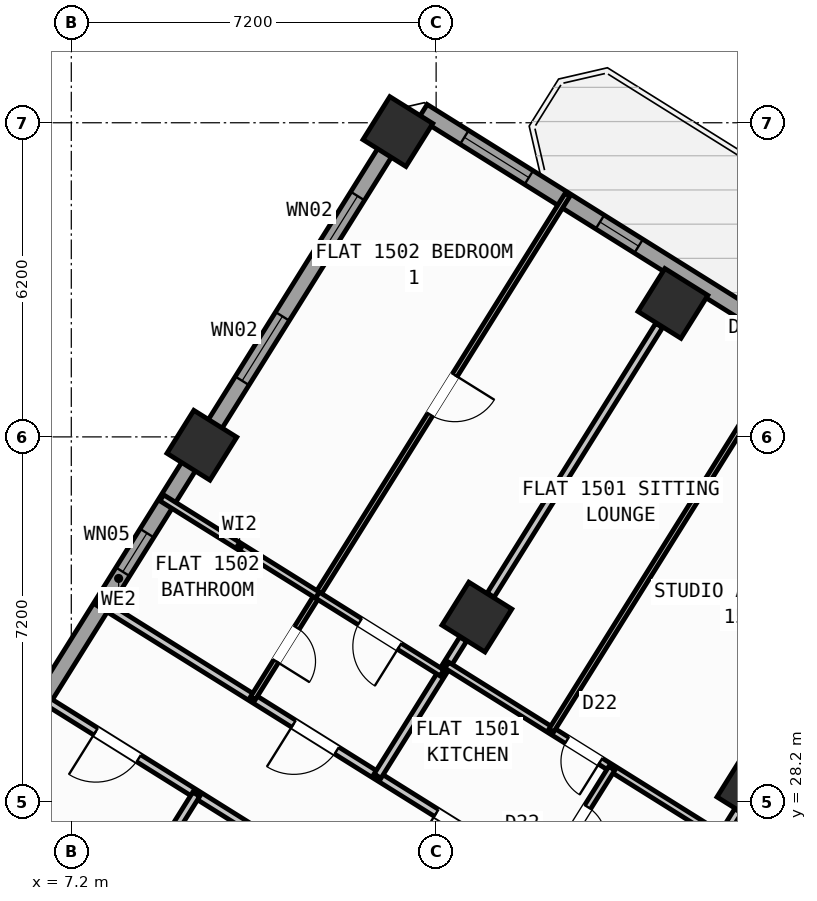
"""IFC4 building model, lengths in metres.
Left out: names, types, materials, properties, quantities, classifications, styles, units other than length and angle.
Written with IfcOpenShell. Run it as: python <this file> out.ifc"""

import sys

from ifc_helpers import new_model, si_unit, direction, frame, frame_2d, origin, origin_2d, place, context, subcontext, project, spatial, rectangle, hollow_rectangle, extrude, source, transform, mapped, element, fill, save


model = new_model("IFC4")
c1 = context("Model", 3, precision=1e-05, world=origin(), true_north=direction((0.0, 1.0)))
c2 = subcontext(c1, "Body", "Model", "MODEL_VIEW")
j1 = project(units=[si_unit("LENGTHUNIT", "METRE"), si_unit("PLANEANGLEUNIT", "RADIAN")], contexts=[c1])
p1 = place(None, origin())
s1 = spatial("IfcSite", under=j1, at=p1, CompositionType="ELEMENT")
p2 = place(p1, origin())
s2 = spatial("IfcBuilding", under=s1, at=p2, CompositionType="ELEMENT")
p3 = place(p2, frame((0.0, 0.0, 60.0)))
s3 = spatial("IfcBuildingStorey", under=s2, at=p3, CompositionType="ELEMENT", Elevation=60.0)
m1 = source(origin(), c2, "Body", "SweptSolid", [
    extrude(hollow_rectangle(XDim=1.0, YDim=1.0, WallThickness=0.04, at=origin_2d()), origin(), (0.0, 0.0, 1.0), 3.6),
])
for number, where, z_axis, x_axis in (
    (1, (20.632, 28.452, 0.0), (0.0, 0.0, 1.0), (-0.848, 0.53, 0.0)),
    (2, (19.073, 38.034, 0.0), (0.0, 0.0, 1.0), (-0.848, 0.53, 0.0)),
    (3, (15.205, 31.844, 0.0), (0.0, 0.0, 1.0), (-0.848, 0.53, 0.0)),
    (4, (13.646, 41.426, 0.0), (0.0, 0.0, 1.0), (-0.848, 0.53, 0.0)),
    (5, (9.777, 35.235, 0.0), (0.0, 0.0, 1.0), (-0.848, 0.53, 0.0)),
):
    element("IfcColumn", number, at=place(p3, frame(where, z_axis=z_axis, x_axis=x_axis)), inside=s3, PredefinedType="COLUMN", context=c2, shape_type="MappedRepresentation", body=[
        mapped(m1, transform((0.0, 0.0, 0.0), scale=1.0)),
    ])
p4 = place(p3, frame((2.415, 23.452, 0.0), z_axis=(0.0, 0.0, 1.0), x_axis=(0.52991049553, 0.848053575387, 0.0)))
e6 = element("IfcWall", 6, at=p4, inside=s3, PredefinedType="STANDARD", context=c2, shape_type="SweptSolid", body=[
    extrude(rectangle(XDim=21.587, YDim=0.32, at=frame_2d((10.794, 0.0))), origin(), (0.0, 0.0, 1.0), 2.725),
])
p5 = place(p4, frame((2.356, 0.0, 0.8)))
e7 = element("IfcOpeningElement", 7, at=p5, cuts=e6, PredefinedType="OPENING", context=c2, shape_type="SweptSolid", body=[
    extrude(rectangle(XDim=2.1, YDim=1.55, at=frame_2d((1.05, 0.775))), frame((0.0, 0.17, 0.0), z_axis=(0.0, -1.0, 0.0), x_axis=(1.0, 0.0, 0.0)), (0.0, 0.0, 1.0), 0.34),
])
p6 = place(p4, frame((10.949, 0.0, 1.0)))
e8 = element("IfcOpeningElement", 8, at=p6, cuts=e6, PredefinedType="OPENING", context=c2, shape_type="SweptSolid", body=[
    extrude(rectangle(XDim=0.9, YDim=1.25, at=frame_2d((0.45, 0.625))), frame((0.0, 0.17, 0.0), z_axis=(0.0, -1.0, 0.0), x_axis=(1.0, 0.0, 0.0)), (0.0, 0.0, 1.0), 0.34),
])
p7 = place(p4, frame((15.394, 0.0, 0.85)))
e9 = element("IfcOpeningElement", 9, at=p7, cuts=e6, PredefinedType="OPENING", context=c2, shape_type="SweptSolid", body=[
    extrude(rectangle(XDim=1.5, YDim=1.5, at=frame_2d((0.75, 0.75))), frame((0.0, 0.17, 0.0), z_axis=(0.0, -1.0, 0.0), x_axis=(1.0, 0.0, 0.0)), (0.0, 0.0, 1.0), 0.34),
])
p8 = place(p4, frame((18.194, 0.0, 0.85)))
e10 = element("IfcOpeningElement", 10, at=p8, cuts=e6, PredefinedType="OPENING", context=c2, shape_type="SweptSolid", body=[
    extrude(rectangle(XDim=1.5, YDim=1.5, at=frame_2d((0.75, 0.75))), frame((0.0, 0.17, 0.0), z_axis=(0.0, -1.0, 0.0), x_axis=(1.0, 0.0, 0.0)), (0.0, 0.0, 1.0), 0.34),
])
p9 = place(p3, frame((14.138, 41.825, 0.0), z_axis=(0.0, 0.0, 1.0), x_axis=(0.848046498049, -0.529921821731, 0.0)))
e11 = element("IfcWall", 11, at=p9, inside=s3, PredefinedType="STANDARD", context=c2, shape_type="SweptSolid", body=[
    extrude(rectangle(XDim=31.588, YDim=0.32, at=frame_2d((15.794, 0.0))), origin(), (0.0, 0.0, 1.0), 3.35),
])
p10 = place(p9, frame((9.772, 0.0, 0.0)))
e12 = element("IfcOpeningElement", 12, at=p10, cuts=e11, PredefinedType="OPENING", context=c2, shape_type="SweptSolid", body=[
    extrude(rectangle(XDim=1.05, YDim=2.15, at=frame_2d((0.525, 1.075))), frame((0.0, 0.17, 0.0), z_axis=(0.0, -1.0, 0.0), x_axis=(1.0, 0.0, 0.0)), (0.0, 0.0, 1.0), 0.34),
])
p11 = place(p9, frame((0.966, 0.0, 0.85)))
e13 = element("IfcOpeningElement", 13, at=p11, cuts=e11, PredefinedType="OPENING", context=c2, shape_type="SweptSolid", body=[
    extrude(rectangle(XDim=1.5, YDim=1.5, at=frame_2d((0.75, 0.75))), frame((0.0, 0.17, 0.0), z_axis=(0.0, -1.0, 0.0), x_axis=(1.0, 0.0, 0.0)), (0.0, 0.0, 1.0), 0.34),
])
p12 = place(p9, frame((4.121, 0.0, 1.0)))
e14 = element("IfcOpeningElement", 14, at=p12, cuts=e11, PredefinedType="OPENING", context=c2, shape_type="SweptSolid", body=[
    extrude(rectangle(XDim=0.9, YDim=1.25, at=frame_2d((0.45, 0.625))), frame((0.0, 0.17, 0.0), z_axis=(0.0, -1.0, 0.0), x_axis=(1.0, 0.0, 0.0)), (0.0, 0.0, 1.0), 0.34),
])
p13 = place(p9, frame((13.899, 0.0, 0.85)))
e15 = element("IfcOpeningElement", 15, at=p13, cuts=e11, PredefinedType="OPENING", context=c2, shape_type="SweptSolid", body=[
    extrude(rectangle(XDim=1.5, YDim=1.5, at=frame_2d((0.75, 0.75))), frame((0.0, 0.17, 0.0), z_axis=(0.0, -1.0, 0.0), x_axis=(1.0, 0.0, 0.0)), (0.0, 0.0, 1.0), 0.34),
])
p14 = place(p9, frame((22.019, 0.0, 0.95)))
e16 = element("IfcOpeningElement", 16, at=p14, cuts=e11, PredefinedType="OPENING", context=c2, shape_type="SweptSolid", body=[
    extrude(rectangle(XDim=1.2, YDim=1.4, at=frame_2d((0.6, 0.7))), frame((0.0, 0.17, 0.0), z_axis=(0.0, -1.0, 0.0), x_axis=(1.0, 0.0, 0.0)), (0.0, 0.0, 1.0), 0.34),
])
p15 = place(p9, frame((27.569, 0.0, 0.95)))
e17 = element("IfcOpeningElement", 17, at=p15, cuts=e11, PredefinedType="OPENING", context=c2, shape_type="SweptSolid", body=[
    extrude(rectangle(XDim=1.2, YDim=1.4, at=frame_2d((0.6, 0.7))), frame((0.0, 0.17, 0.0), z_axis=(0.0, -1.0, 0.0), x_axis=(1.0, 0.0, 0.0)), (0.0, 0.0, 1.0), 0.34),
])
p16 = place(p3, frame((21.885, 23.306, 0.0), z_axis=(0.0, 0.0, 1.0), x_axis=(-0.848052408131, 0.529912363569, 0.0)))
e18 = element("IfcWall", 18, at=p16, inside=s3, PredefinedType="PARTITIONING", context=c2, shape_type="SweptSolid", body=[
    extrude(rectangle(XDim=16.73, YDim=0.16, at=frame_2d((8.365, 0.0))), origin(), (0.0, 0.0, 1.0), 3.34),
])
p17 = place(p16, frame((1.395, 0.0, 0.0)))
e19 = element("IfcOpeningElement", 19, at=p17, cuts=e18, PredefinedType="OPENING", context=c2, shape_type="SweptSolid", body=[
    extrude(rectangle(XDim=1.0, YDim=2.1, at=frame_2d((0.5, 1.05))), frame((0.0, 0.09, 0.0), z_axis=(0.0, -1.0, 0.0), x_axis=(1.0, 0.0, 0.0)), (0.0, 0.0, 1.0), 0.18),
])
p18 = place(p16, frame((7.82, 0.0, 0.0)))
e20 = element("IfcOpeningElement", 20, at=p18, cuts=e18, PredefinedType="OPENING", context=c2, shape_type="SweptSolid", body=[
    extrude(rectangle(XDim=1.0, YDim=2.1, at=frame_2d((0.5, 1.05))), frame((0.0, 0.09, 0.0), z_axis=(0.0, -1.0, 0.0), x_axis=(1.0, 0.0, 0.0)), (0.0, 0.0, 1.0), 0.18),
])
p19 = place(p16, frame((11.14, 0.0, 0.0)))
e21 = element("IfcOpeningElement", 21, at=p19, cuts=e18, PredefinedType="OPENING", context=c2, shape_type="SweptSolid", body=[
    extrude(rectangle(XDim=1.0, YDim=2.1, at=frame_2d((0.5, 1.05))), frame((0.0, 0.09, 0.0), z_axis=(0.0, -1.0, 0.0), x_axis=(1.0, 0.0, 0.0)), (0.0, 0.0, 1.0), 0.18),
])
p20 = place(p3, frame((20.719, 21.44, 0.0), z_axis=(0.0, 0.0, 1.0), x_axis=(-0.848048310262, 0.529918921593, 0.0)))
e22 = element("IfcWall", 22, at=p20, inside=s3, PredefinedType="PARTITIONING", context=c2, shape_type="SweptSolid", body=[
    extrude(rectangle(XDim=16.73, YDim=0.16, at=frame_2d((8.365, 0.0))), origin(), (0.0, 0.0, 1.0), 3.34),
])
p21 = place(p20, frame((0.92, 0.0, 0.0)))
e23 = element("IfcOpeningElement", 23, at=p21, cuts=e22, PredefinedType="OPENING", context=c2, shape_type="SweptSolid", body=[
    extrude(rectangle(XDim=1.0, YDim=2.1, at=frame_2d((0.5, 1.05))), frame((0.0, 0.09, 0.0), z_axis=(0.0, -1.0, 0.0), x_axis=(1.0, 0.0, 0.0)), (0.0, 0.0, 1.0), 0.18),
])
p22 = place(p20, frame((4.408, 0.0, 0.0)))
e24 = element("IfcOpeningElement", 24, at=p22, cuts=e22, PredefinedType="OPENING", context=c2, shape_type="SweptSolid", body=[
    extrude(rectangle(XDim=1.0, YDim=2.1, at=frame_2d((0.5, 1.05))), frame((0.0, 0.09, 0.0), z_axis=(0.0, -1.0, 0.0), x_axis=(1.0, 0.0, 0.0)), (0.0, 0.0, 1.0), 0.18),
])
p23 = place(p20, frame((7.271, 0.0, 0.0)))
e25 = element("IfcOpeningElement", 25, at=p23, cuts=e22, PredefinedType="OPENING", context=c2, shape_type="SweptSolid", body=[
    extrude(rectangle(XDim=1.0, YDim=2.1, at=frame_2d((0.5, 1.05))), frame((0.0, 0.09, 0.0), z_axis=(0.0, -1.0, 0.0), x_axis=(1.0, 0.0, 0.0)), (0.0, 0.0, 1.0), 0.18),
])
p24 = place(p20, frame((10.78, 0.0, 0.0)))
e26 = element("IfcOpeningElement", 26, at=p24, cuts=e22, PredefinedType="OPENING", context=c2, shape_type="SweptSolid", body=[
    extrude(rectangle(XDim=1.0, YDim=2.1, at=frame_2d((0.5, 1.05))), frame((0.0, 0.09, 0.0), z_axis=(0.0, -1.0, 0.0), x_axis=(1.0, 0.0, 0.0)), (0.0, 0.0, 1.0), 0.18),
])
p25 = place(p20, frame((14.372, 0.0, 0.0)))
e27 = element("IfcOpeningElement", 27, at=p25, cuts=e22, PredefinedType="OPENING", context=c2, shape_type="SweptSolid", body=[
    extrude(rectangle(XDim=1.0, YDim=2.1, at=frame_2d((0.5, 1.05))), frame((0.0, 0.09, 0.0), z_axis=(0.0, -1.0, 0.0), x_axis=(1.0, 0.0, 0.0)), (0.0, 0.0, 1.0), 0.18),
])
p26 = place(p3, frame((9.666, 28.347, 0.0), z_axis=(0.0, 0.0, 1.0), x_axis=(-0.529928058306, -0.848042600947, 0.0)))
e28 = element("IfcWall", 28, at=p26, inside=s3, PredefinedType="PARTITIONING", context=c2, shape_type="SweptSolid", body=[
    extrude(rectangle(XDim=8.05, YDim=0.16, at=frame_2d((4.025, 0.0))), origin(), (0.0, 0.0, 1.0), 3.34),
])
p27 = place(p3, frame((20.361, 28.018, 0.0), z_axis=(0.0, 0.0, 1.0), x_axis=(-0.529875025416, -0.848075738033, 0.0)))
e29 = element("IfcWall", 29, at=p27, inside=s3, PredefinedType="PARTITIONING", context=c2, shape_type="SweptSolid", body=[
    extrude(rectangle(XDim=3.188, YDim=0.16, at=frame_2d((1.594, 0.0))), origin(), (0.0, 0.0, 1.0), 2.725),
])
p28 = place(p3, frame((18.802, 37.6, 0.0), z_axis=(0.0, 0.0, 1.0), x_axis=(-0.529915015264, -0.848050751193, 0.0)))
e30 = element("IfcWall", 30, at=p28, inside=s3, PredefinedType="PARTITIONING", context=c2, shape_type="SweptSolid", body=[
    extrude(rectangle(XDim=6.276, YDim=0.16, at=frame_2d((3.138, 0.0))), origin(), (0.0, 0.0, 1.0), 2.725),
])
p29 = place(p3, frame((14.933, 31.409, 0.0), z_axis=(0.0, 0.0, 1.0), x_axis=(-0.529875025416, -0.848075738033, 0.0)))
e31 = element("IfcWall", 31, at=p29, inside=s3, PredefinedType="PARTITIONING", context=c2, shape_type="SweptSolid", body=[
    extrude(rectangle(XDim=3.188, YDim=0.16, at=frame_2d((1.594, 0.0))), origin(), (0.0, 0.0, 1.0), 2.725),
])
p30 = place(p3, frame((20.039, 27.502, 0.0), z_axis=(0.0, 0.0, 1.0), x_axis=(-0.848039019877, 0.529933789039, 0.0)))
e32 = element("IfcWall", 32, at=p30, inside=s3, PredefinedType="PLUMBINGWALL", context=c2, shape_type="SweptSolid", body=[
    extrude(rectangle(XDim=6.4, YDim=0.14, at=frame_2d((3.2, 0.0))), origin(), (0.0, 0.0, 1.0), 3.34),
])
p31 = place(p30, frame((2.824, 0.0, 0.0)))
e33 = element("IfcOpeningElement", 33, at=p31, cuts=e32, PredefinedType="OPENING", context=c2, shape_type="SweptSolid", body=[
    extrude(rectangle(XDim=0.78, YDim=2.05, at=frame_2d((0.39, 1.025))), frame((0.0, 0.08, 0.0), z_axis=(0.0, -1.0, 0.0), x_axis=(1.0, 0.0, 0.0)), (0.0, 0.0, 1.0), 0.16),
])
p32 = place(p3, frame((17.867, 28.859, 0.0), z_axis=(0.0, 0.0, 1.0), x_axis=(-0.529913878929, -0.848051461244, 0.0)))
e34 = element("IfcWall", 34, at=p32, inside=s3, PredefinedType="PLUMBINGWALL", context=c2, shape_type="SweptSolid", body=[
    extrude(rectangle(XDim=2.58, YDim=0.14, at=frame_2d((1.29, 0.0))), origin(), (0.0, 0.0, 1.0), 3.34),
])
p33 = place(p32, frame((0.9, 0.0, 0.0)))
e35 = element("IfcOpeningElement", 35, at=p33, cuts=e34, PredefinedType="OPENING", context=c2, shape_type="SweptSolid", body=[
    extrude(rectangle(XDim=0.78, YDim=2.05, at=frame_2d((0.39, 1.025))), frame((0.0, 0.08, 0.0), z_axis=(0.0, -1.0, 0.0), x_axis=(1.0, 0.0, 0.0)), (0.0, 0.0, 1.0), 0.16),
])
p34 = place(p3, frame((21.517, 37.356, 0.0), z_axis=(0.0, 0.0, 1.0), x_axis=(-0.529919705034, -0.848047820713, 0.0)))
e36 = element("IfcWall", 36, at=p34, inside=s3, PredefinedType="PARTITIONING", context=c2, shape_type="SweptSolid", body=[
    extrude(rectangle(XDim=9.14, YDim=0.11, at=frame_2d((4.57, 0.0))), origin(), (0.0, 0.0, 1.0), 3.34),
])
p35 = place(p34, frame((0.47, 0.0, 0.0)))
e37 = element("IfcOpeningElement", 37, at=p35, cuts=e36, PredefinedType="OPENING", context=c2, shape_type="SweptSolid", body=[
    extrude(rectangle(XDim=0.92, YDim=2.08, at=frame_2d((0.46, 1.04))), frame((0.0, 0.065, 0.0), z_axis=(0.0, -1.0, 0.0), x_axis=(1.0, 0.0, 0.0)), (0.0, 0.0, 1.0), 0.13),
])
p36 = place(p3, frame((16.995, 40.182, 0.0), z_axis=(0.0, 0.0, 1.0), x_axis=(-0.529927783988, -0.848042772363, 0.0)))
e38 = element("IfcWall", 38, at=p36, inside=s3, PredefinedType="PARTITIONING", context=c2, shape_type="SweptSolid", body=[
    extrude(rectangle(XDim=11.72, YDim=0.11, at=frame_2d((5.86, 0.0))), origin(), (0.0, 0.0, 1.0), 3.34),
])
p37 = place(p36, frame((10.08, 0.0, 0.0)))
e39 = element("IfcOpeningElement", 39, at=p37, cuts=e38, PredefinedType="OPENING", context=c2, shape_type="SweptSolid", body=[
    extrude(rectangle(XDim=0.78, YDim=2.05, at=frame_2d((0.39, 1.025))), frame((0.0, 0.065, 0.0), z_axis=(0.0, -1.0, 0.0), x_axis=(1.0, 0.0, 0.0)), (0.0, 0.0, 1.0), 0.13),
])
p38 = place(p36, frame((4.2, 0.0, 0.0)))
e40 = element("IfcOpeningElement", 40, at=p38, cuts=e38, PredefinedType="OPENING", context=c2, shape_type="SweptSolid", body=[
    extrude(rectangle(XDim=0.92, YDim=2.08, at=frame_2d((0.46, 1.04))), frame((0.0, 0.065, 0.0), z_axis=(0.0, -1.0, 0.0), x_axis=(1.0, 0.0, 0.0)), (0.0, 0.0, 1.0), 0.13),
])
p39 = place(p3, frame((14.516, 30.741, 0.0), z_axis=(0.0, 0.0, 1.0), x_axis=(-0.848059786386, 0.529900555496, 0.0)))
e41 = element("IfcWall", 41, at=p39, inside=s3, PredefinedType="PLUMBINGWALL", context=c2, shape_type="SweptSolid", body=[
    extrude(rectangle(XDim=2.9, YDim=0.14, at=frame_2d((1.45, 0.0))), origin(), (0.0, 0.0, 1.0), 3.34),
])
p40 = place(p39, frame((0.99, 0.0, 0.0)))
e42 = element("IfcOpeningElement", 42, at=p40, cuts=e41, PredefinedType="OPENING", context=c2, shape_type="SweptSolid", body=[
    extrude(rectangle(XDim=0.92, YDim=2.08, at=frame_2d((0.46, 1.04))), frame((0.0, 0.08, 0.0), z_axis=(0.0, -1.0, 0.0), x_axis=(1.0, 0.0, 0.0)), (0.0, 0.0, 1.0), 0.16),
])
p41 = place(p3, frame((12.056, 32.278, 0.0), z_axis=(0.0, 0.0, 1.0), x_axis=(-0.848039976902, 0.529932257535, 0.0)))
e43 = element("IfcWall", 43, at=p41, inside=s3, PredefinedType="PLUMBINGWALL", context=c2, shape_type="SweptSolid", body=[
    extrude(rectangle(XDim=3.62, YDim=0.14, at=frame_2d((1.81, 0.0))), origin(), (0.0, 0.0, 1.0), 3.34),
])
m2 = source(origin(), c2, "Body", "SweptSolid", [
    extrude(rectangle(XDim=0.9, YDim=1.25, at=frame_2d((0.45, 0.625))), frame((0.0, 0.03, 0.0), z_axis=(0.0, -1.0, 0.0), x_axis=(1.0, 0.0, 0.0)), (0.0, 0.0, 1.0), 0.06),
])
p42 = place(p6, origin())
e44 = element("IfcWindow", 44, at=p42, inside=s3, PartitioningType="SINGLE_PANEL", PredefinedType="WINDOW", context=c2, shape_type="MappedRepresentation", body=[
    mapped(m2, transform((0.0, 0.0, 0.0), scale=1.0)),
])
fill(e8, e44)
m3 = source(origin(), c2, "Body", "SweptSolid", [
    extrude(rectangle(XDim=1.5, YDim=1.5, at=frame_2d((0.75, 0.75))), frame((0.0, 0.03, 0.0), z_axis=(0.0, -1.0, 0.0), x_axis=(1.0, 0.0, 0.0)), (0.0, 0.0, 1.0), 0.06),
])
p43 = place(p7, origin())
e45 = element("IfcWindow", 45, at=p43, inside=s3, PartitioningType="SINGLE_PANEL", PredefinedType="WINDOW", context=c2, shape_type="MappedRepresentation", body=[
    mapped(m3, transform((0.0, 0.0, 0.0), scale=1.0)),
])
fill(e9, e45)
p44 = place(p8, origin())
e46 = element("IfcWindow", 46, at=p44, inside=s3, PartitioningType="SINGLE_PANEL", PredefinedType="WINDOW", context=c2, shape_type="MappedRepresentation", body=[
    mapped(m3, transform((0.0, 0.0, 0.0), scale=1.0)),
])
fill(e10, e46)
p45 = place(p11, origin())
e47 = element("IfcWindow", 47, at=p45, inside=s3, PartitioningType="SINGLE_PANEL", PredefinedType="WINDOW", context=c2, shape_type="MappedRepresentation", body=[
    mapped(m3, transform((0.0, 0.0, 0.0), scale=1.0)),
])
fill(e13, e47)
p46 = place(p12, origin())
e48 = element("IfcWindow", 48, at=p46, inside=s3, PartitioningType="SINGLE_PANEL", PredefinedType="WINDOW", context=c2, shape_type="MappedRepresentation", body=[
    mapped(m2, transform((0.0, 0.0, 0.0), scale=1.0)),
])
fill(e14, e48)
m4 = source(origin(), c2, "Body", "SweptSolid", [
    extrude(rectangle(XDim=1.0, YDim=2.1, at=frame_2d((0.5, 1.05))), frame((0.0, 0.025, 0.0), z_axis=(0.0, -1.0, 0.0), x_axis=(1.0, 0.0, 0.0)), (0.0, 0.0, 1.0), 0.05),
])
p47 = place(p25, origin())
e49 = element("IfcDoor", 49, at=p47, inside=s3, OperationType="SINGLE_SWING_RIGHT", PredefinedType="DOOR", context=c2, shape_type="MappedRepresentation", body=[
    mapped(m4, transform((0.0, 0.0, 0.0), scale=1.0)),
])
fill(e27, e49)
p48 = place(p18, origin())
e50 = element("IfcDoor", 50, at=p48, inside=s3, OperationType="SINGLE_SWING_RIGHT", PredefinedType="DOOR", context=c2, shape_type="MappedRepresentation", body=[
    mapped(m4, transform((0.0, 0.0, 0.0), scale=1.0)),
])
fill(e20, e50)
m5 = source(origin(), c2, "Body", "SweptSolid", [
    extrude(rectangle(XDim=0.78, YDim=2.05, at=frame_2d((0.39, 1.025))), frame((0.0, 0.025, 0.0), z_axis=(0.0, -1.0, 0.0), x_axis=(1.0, 0.0, 0.0)), (0.0, 0.0, 1.0), 0.05),
])
p49 = place(p31, origin())
e51 = element("IfcDoor", 51, at=p49, inside=s3, OperationType="SINGLE_SWING_LEFT", PredefinedType="DOOR", context=c2, shape_type="MappedRepresentation", body=[
    mapped(m5, transform((0.0, 0.0, 0.0), scale=1.0)),
])
fill(e33, e51)
p50 = place(p33, origin())
e52 = element("IfcDoor", 52, at=p50, inside=s3, OperationType="SINGLE_SWING_RIGHT", PredefinedType="DOOR", context=c2, shape_type="MappedRepresentation", body=[
    mapped(m5, transform((0.0, 0.0, 0.0), scale=1.0)),
])
fill(e35, e52)
p51 = place(p19, origin())
e53 = element("IfcDoor", 53, at=p51, inside=s3, OperationType="SINGLE_SWING_RIGHT", PredefinedType="DOOR", context=c2, shape_type="MappedRepresentation", body=[
    mapped(m4, transform((0.0, 0.0, 0.0), scale=1.0)),
])
fill(e21, e53)
m6 = source(origin(), c2, "Body", "SweptSolid", [
    extrude(rectangle(XDim=0.92, YDim=2.08, at=frame_2d((0.46, 1.04))), frame((0.0, 0.025, 0.0), z_axis=(0.0, -1.0, 0.0), x_axis=(1.0, 0.0, 0.0)), (0.0, 0.0, 1.0), 0.05),
])
p52 = place(p40, origin())
e54 = element("IfcDoor", 54, at=p52, inside=s3, OperationType="SINGLE_SWING_LEFT", PredefinedType="DOOR", context=c2, shape_type="MappedRepresentation", body=[
    mapped(m6, transform((0.0, 0.0, 0.0), scale=1.0)),
])
fill(e42, e54)
p53 = place(p37, origin())
e55 = element("IfcDoor", 55, at=p53, inside=s3, OperationType="SINGLE_SWING_RIGHT", PredefinedType="DOOR", context=c2, shape_type="MappedRepresentation", body=[
    mapped(m5, transform((0.0, 0.0, 0.0), scale=1.0)),
])
fill(e39, e55)
p54 = place(p38, origin())
e56 = element("IfcDoor", 56, at=p54, inside=s3, OperationType="SINGLE_SWING_LEFT", PredefinedType="DOOR", context=c2, shape_type="MappedRepresentation", body=[
    mapped(m6, transform((0.0, 0.0, 0.0), scale=1.0)),
])
fill(e40, e56)
save(model, sys.argv[1])
